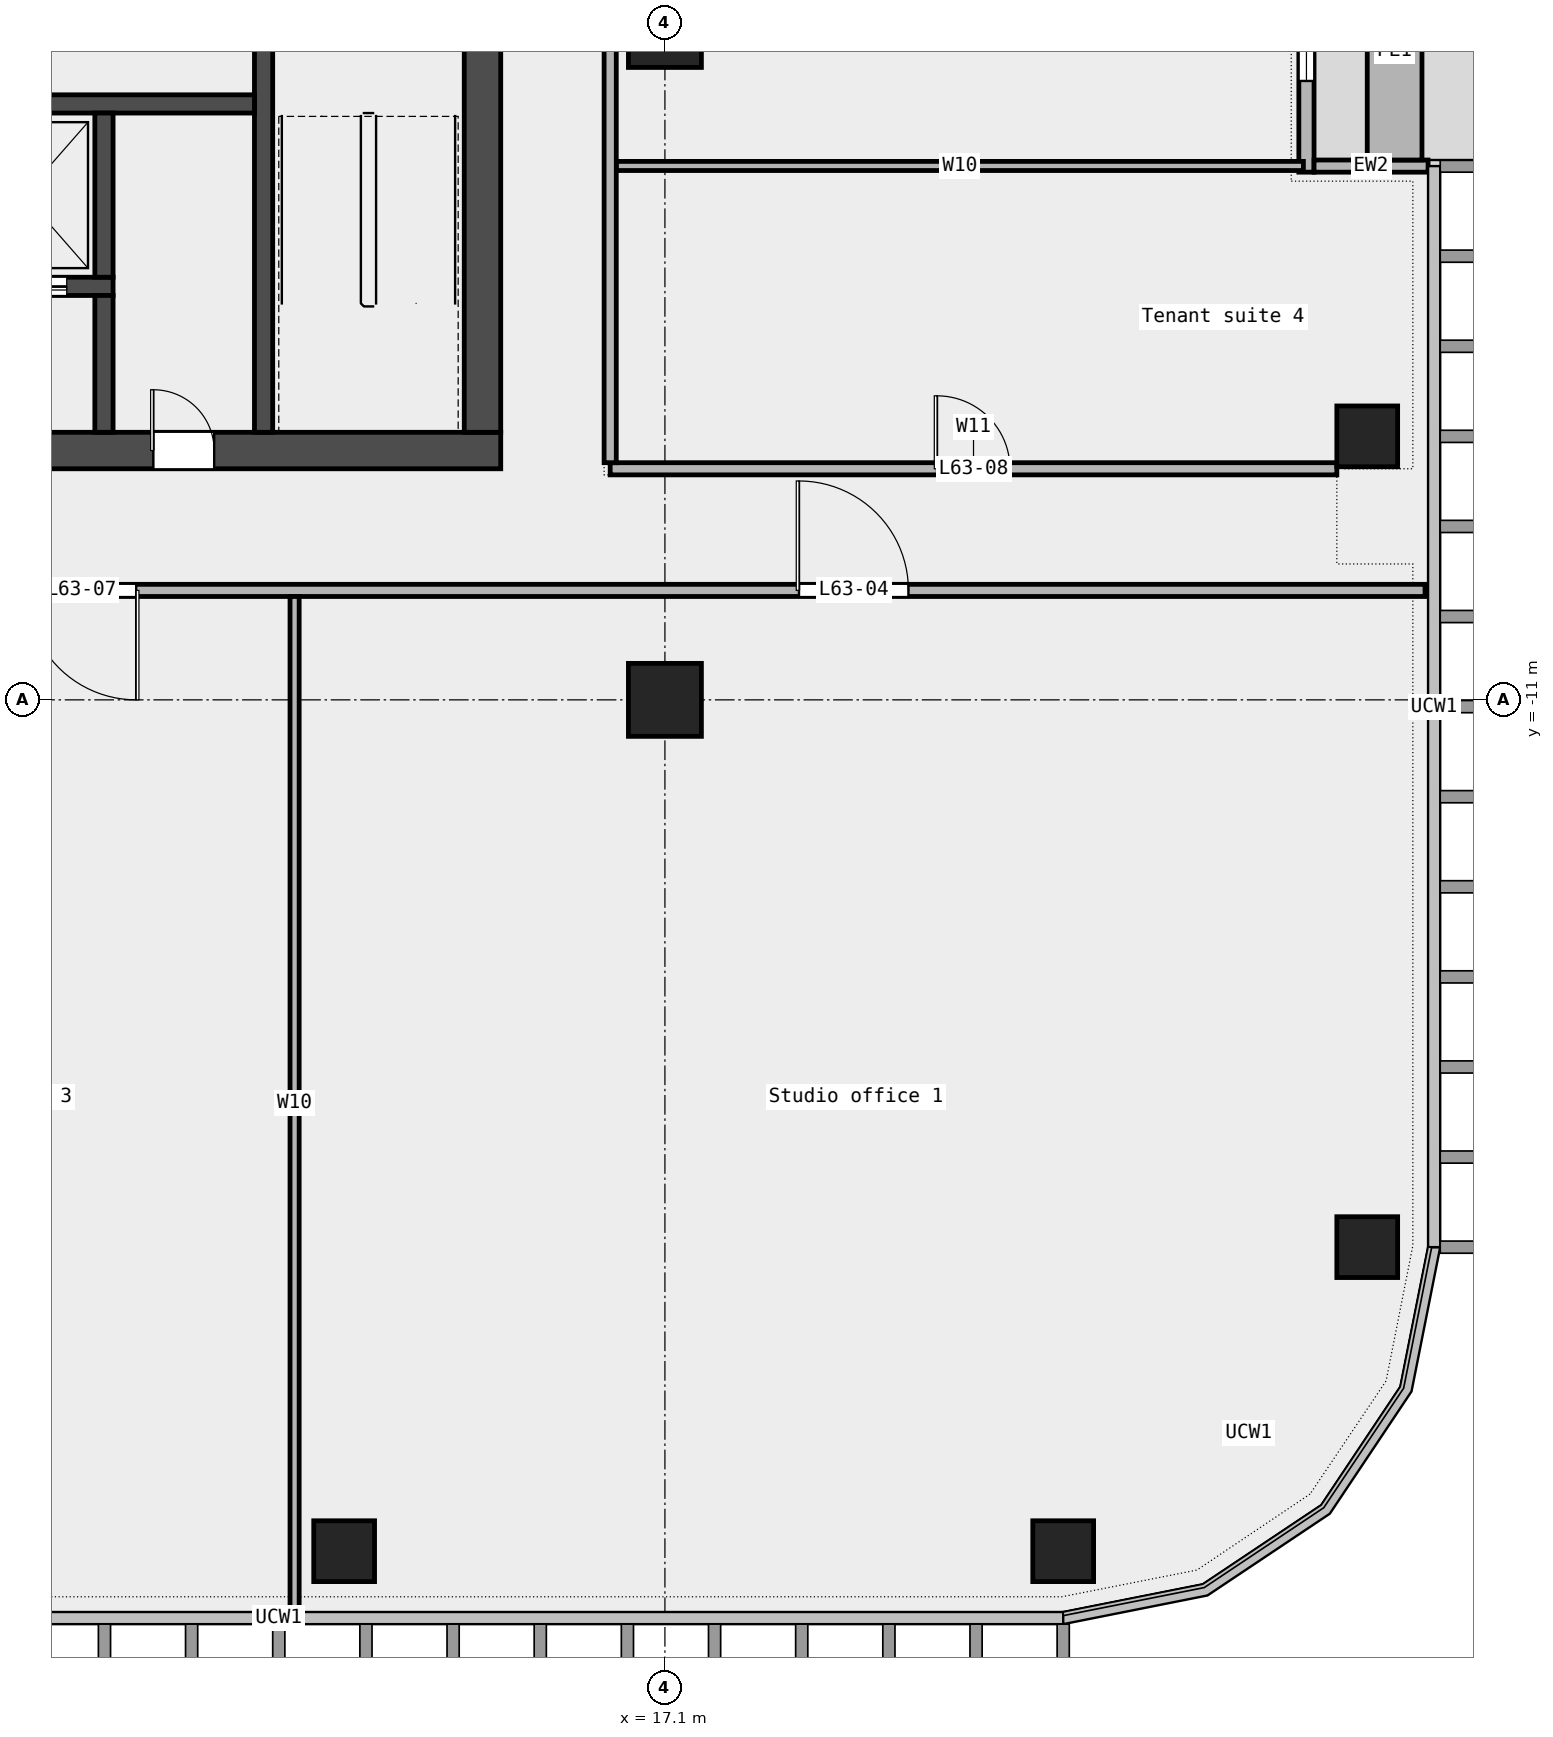
"""IFC4 building model, lengths in metres.
Left out: names, types, materials, properties, quantities, classifications, styles, units other than length and angle.
Written with IfcOpenShell. Run it as: python <this file> out.ifc"""

import sys

from ifc_helpers import new_model, si_unit, direction, frame, frame_2d, origin, origin_2d, place, context, subcontext, project, spatial, rectangle, extrude, element, fill, save


model = new_model("IFC4")
c1 = context("Model", 3, precision=1e-05, world=origin(), true_north=direction((0.0, 1.0)))
c2 = subcontext(c1, "Body", "Model", "MODEL_VIEW")
j1 = project(units=[si_unit("LENGTHUNIT", "METRE"), si_unit("PLANEANGLEUNIT", "RADIAN")], contexts=[c1])
p1 = place(None, origin())
s1 = spatial("IfcSite", under=j1, at=p1, CompositionType="ELEMENT")
p2 = place(p1, origin())
s2 = spatial("IfcBuilding", under=s1, at=p2, CompositionType="ELEMENT")
p3 = place(p2, frame((0.0, 0.0, 291.4)))
s3 = spatial("IfcBuildingStorey", under=s2, at=p3, CompositionType="ELEMENT", Elevation=291.4)
for number, where, z_axis, x_axis in (
    (1, (11.825, -25.0, 0.0), (0.0, 0.0, 1.0), (1.0, 0.0, 0.0)),
    (2, (23.65, -25.0, 0.0), (0.0, 0.0, 1.0), (1.0, 0.0, 0.0)),
    (3, (28.65, -20.0, 0.0), (0.0, 0.0, 1.0), (1.0, 0.0, 0.0)),
    (4, (28.65, -6.667, 0.0), (0.0, 0.0, 1.0), (1.0, 0.0, 0.0)),
):
    element("IfcColumn", number, at=place(p3, frame(where, z_axis=z_axis, x_axis=x_axis)), inside=s3, PredefinedType="COLUMN", context=c2, shape_type="SweptSolid", body=[
        extrude(rectangle(XDim=1.0, YDim=1.0, at=origin_2d()), origin(), (0.0, 0.0, 1.0), 3.6),
    ])
for number, where, z_axis, x_axis in (
    (5, (17.1, -11.0, 0.0), (0.0, 0.0, 1.0), (1.0, 0.0, 0.0)),
    (6, (17.1, 0.0, 0.0), (0.0, 0.0, 1.0), (1.0, 0.0, 0.0)),
):
    element("IfcColumn", number, at=place(p3, frame(where, z_axis=z_axis, x_axis=x_axis)), inside=s3, PredefinedType="COLUMN", context=c2, shape_type="SweptSolid", body=[
        extrude(rectangle(XDim=1.2, YDim=1.2, at=origin_2d()), origin(), (0.0, 0.0, 1.0), 3.6),
    ])
p4 = place(p3, frame((27.65, -2.322, 0.0), z_axis=(0.0, 0.0, 1.0), x_axis=(0.0, 1.0, 0.0)))
e7 = element("IfcWall", 7, at=p4, inside=s3, PredefinedType="STANDARD", context=c2, shape_type="SweptSolid", body=[
    extrude(rectangle(XDim=13.533, YDim=0.25, at=frame_2d((6.767, 0.0))), origin(), (0.0, 0.0, 1.0), 3.6),
])
p5 = place(p4, frame((1.5, 0.0, 0.45)))
e8 = element("IfcOpeningElement", 8, at=p5, cuts=e7, PredefinedType="OPENING", context=c2, shape_type="SweptSolid", body=[
    extrude(rectangle(XDim=1.5, YDim=2.4, at=frame_2d((0.75, 1.2))), frame((0.0, 0.137, 0.0), z_axis=(0.0, -1.0, 0.0), x_axis=(1.0, 0.0, 0.0)), (0.0, 0.0, 1.0), 0.274),
])
p6 = place(p4, frame((5.75, 0.0, 0.0)))
e9 = element("IfcOpeningElement", 9, at=p6, cuts=e7, PredefinedType="OPENING", context=c2, shape_type="SweptSolid", body=[
    extrude(rectangle(XDim=1.8, YDim=2.4, at=frame_2d((0.9, 1.2))), frame((0.0, 0.137, 0.0), z_axis=(0.0, -1.0, 0.0), x_axis=(1.0, 0.0, 0.0)), (0.0, 0.0, 1.0), 0.274),
])
p7 = place(p4, frame((10.5, 0.0, 0.45)))
e10 = element("IfcOpeningElement", 10, at=p7, cuts=e7, PredefinedType="OPENING", context=c2, shape_type="SweptSolid", body=[
    extrude(rectangle(XDim=1.5, YDim=2.4, at=frame_2d((0.75, 1.2))), frame((0.0, 0.137, 0.0), z_axis=(0.0, -1.0, 0.0), x_axis=(1.0, 0.0, 0.0)), (0.0, 0.0, 1.0), 0.274),
])
p8 = place(p3, frame((29.65, -2.222, 0.0), z_axis=(0.0, 0.0, 1.0), x_axis=(-1.0, 0.0, 0.0)))
e11 = element("IfcWall", 11, at=p8, inside=s3, PredefinedType="STANDARD", context=c2, shape_type="SweptSolid", body=[
    extrude(rectangle(XDim=1.875, YDim=0.2, at=frame_2d((0.938, 0.0))), origin(), (0.0, 0.0, 1.0), 3.6),
])
p9 = place(p3, frame((29.1, -2.122, 0.0), z_axis=(0.0, 0.0, 1.0), x_axis=(0.0, 1.0, 0.0)))
e12 = element("IfcWall", 12, at=p9, inside=s3, PredefinedType="STANDARD", context=c2, shape_type="SweptSolid", body=[
    extrude(rectangle(XDim=3.6, YDim=0.9, at=frame_2d((1.8, 0.0))), origin(), (0.0, 0.0, 1.0), 0.7),
])
p10 = place(p3, frame((-29.6, -9.2, 0.0), z_axis=(0.0, 0.0, 1.0), x_axis=(1.0, 0.0, 0.0)))
e13 = element("IfcWall", 13, at=p10, inside=s3, PredefinedType="PARTITIONING", context=c2, shape_type="SweptSolid", body=[
    extrude(rectangle(XDim=59.2, YDim=0.2, at=frame_2d((29.6, 0.0))), origin(), (0.0, 0.0, 1.0), 3.6),
])
p11 = place(p10, frame((48.905, 0.0, 0.0)))
e14 = element("IfcOpeningElement", 14, at=p11, cuts=e13, PredefinedType="OPENING", context=c2, shape_type="SweptSolid", body=[
    extrude(rectangle(XDim=1.8, YDim=2.1, at=frame_2d((0.9, 1.05))), frame((0.0, 0.112, 0.0), z_axis=(0.0, -1.0, 0.0), x_axis=(1.0, 0.0, 0.0)), (0.0, 0.0, 1.0), 0.224),
])
p12 = place(p10, frame((36.205, 0.0, 0.0)))
e15 = element("IfcOpeningElement", 15, at=p12, cuts=e13, PredefinedType="OPENING", context=c2, shape_type="SweptSolid", body=[
    extrude(rectangle(XDim=1.8, YDim=2.1, at=frame_2d((0.9, 1.05))), frame((0.0, 0.112, 0.0), z_axis=(0.0, -1.0, 0.0), x_axis=(1.0, 0.0, 0.0)), (0.0, 0.0, 1.0), 0.224),
])
p13 = place(p10, frame((20.1, 0.0, 0.0)))
e16 = element("IfcOpeningElement", 16, at=p13, cuts=e13, PredefinedType="OPENING", context=c2, shape_type="SweptSolid", body=[
    extrude(rectangle(XDim=1.8, YDim=2.1, at=frame_2d((0.9, 1.05))), frame((0.0, 0.112, 0.0), z_axis=(0.0, -1.0, 0.0), x_axis=(1.0, 0.0, 0.0)), (0.0, 0.0, 1.0), 0.224),
])
p14 = place(p10, frame((6.475, 0.0, 0.0)))
e17 = element("IfcOpeningElement", 17, at=p14, cuts=e13, PredefinedType="OPENING", context=c2, shape_type="SweptSolid", body=[
    extrude(rectangle(XDim=1.8, YDim=2.1, at=frame_2d((0.9, 1.05))), frame((0.0, 0.112, 0.0), z_axis=(0.0, -1.0, 0.0), x_axis=(1.0, 0.0, 0.0)), (0.0, 0.0, 1.0), 0.224),
])
p15 = place(p10, frame((28.425, 0.0, 0.0)))
e18 = element("IfcOpeningElement", 18, at=p15, cuts=e13, PredefinedType="OPENING", context=c2, shape_type="SweptSolid", body=[
    extrude(rectangle(XDim=1.2, YDim=2.1, at=frame_2d((0.6, 1.05))), frame((0.0, 0.112, 0.0), z_axis=(0.0, -1.0, 0.0), x_axis=(1.0, 0.0, 0.0)), (0.0, 0.0, 1.0), 0.224),
])
p16 = place(p3, frame((16.2, -7.2, 0.0), z_axis=(0.0, 0.0, 1.0), x_axis=(1.0, 0.0, 0.0)))
e19 = element("IfcWall", 19, at=p16, inside=s3, PredefinedType="PARTITIONING", context=c2, shape_type="SweptSolid", body=[
    extrude(rectangle(XDim=11.95, YDim=0.2, at=frame_2d((5.975, 0.0))), origin(), (0.0, 0.0, 1.0), 3.6),
])
p17 = place(p16, frame((5.375, 0.0, 0.0)))
e20 = element("IfcOpeningElement", 20, at=p17, cuts=e19, PredefinedType="OPENING", context=c2, shape_type="SweptSolid", body=[
    extrude(rectangle(XDim=1.2, YDim=2.1, at=frame_2d((0.6, 1.05))), frame((0.0, 0.112, 0.0), z_axis=(0.0, -1.0, 0.0), x_axis=(1.0, 0.0, 0.0)), (0.0, 0.0, 1.0), 0.224),
])
p18 = place(p3, frame((16.3, -2.22, 0.0), z_axis=(0.0, 0.0, 1.0), x_axis=(1.0, 0.0, 0.0)))
e21 = element("IfcWall", 21, at=p18, inside=s3, PredefinedType="PARTITIONING", context=c2, shape_type="SweptSolid", body=[
    extrude(rectangle(XDim=11.3, YDim=0.15, at=frame_2d((5.65, 0.0))), origin(), (0.0, 0.0, 1.0), 3.6),
])
p19 = place(p3, frame((11.01, -25.95, 0.0), z_axis=(0.0, 0.0, 1.0), x_axis=(0.0, 1.0, 0.0)))
e22 = element("IfcWall", 22, at=p19, inside=s3, PredefinedType="PARTITIONING", context=c2, shape_type="SweptSolid", body=[
    extrude(rectangle(XDim=16.65, YDim=0.15, at=frame_2d((8.325, 0.0))), origin(), (0.0, 0.0, 1.0), 3.6),
])
p20 = place(p3, frame((16.2, -7.1, 0.0), z_axis=(0.0, 0.0, 1.0), x_axis=(0.0, 1.0, 0.0)))
e23 = element("IfcWall", 23, at=p20, inside=s3, PredefinedType="PARTITIONING", context=c2, shape_type="SweptSolid", body=[
    extrude(rectangle(XDim=20.5, YDim=0.2, at=frame_2d((10.25, 0.0))), origin(), (0.0, 0.0, 1.0), 3.6),
])
p21 = place(p20, frame((10.795, 0.0, 0.0)))
e24 = element("IfcOpeningElement", 24, at=p21, cuts=e23, PredefinedType="OPENING", context=c2, shape_type="SweptSolid", body=[
    extrude(rectangle(XDim=1.5, YDim=2.1, at=frame_2d((0.75, 1.05))), frame((0.0, 0.112, 0.0), z_axis=(0.0, -1.0, 0.0), x_axis=(1.0, 0.0, 0.0)), (0.0, 0.0, 1.0), 0.224),
])
p22 = place(p3, frame((-14.4, -6.9, 0.0), z_axis=(0.0, 0.0, 1.0), x_axis=(1.0, 0.0, 0.0)))
e25 = element("IfcWall", 25, at=p22, inside=s3, PredefinedType="SHEAR", context=c2, shape_type="SweptSolid", body=[
    extrude(rectangle(XDim=28.8, YDim=0.6, at=frame_2d((14.4, 0.0))), origin(), (0.0, 0.0, 1.0), 3.7),
])
p23 = place(p22, frame((4.712, 0.0, 0.0)))
e26 = element("IfcOpeningElement", 26, at=p23, cuts=e25, PredefinedType="OPENING", context=c2, shape_type="SweptSolid", body=[
    extrude(rectangle(XDim=1.0, YDim=2.1, at=frame_2d((0.5, 1.05))), frame((0.0, 0.312, 0.0), z_axis=(0.0, -1.0, 0.0), x_axis=(1.0, 0.0, 0.0)), (0.0, 0.0, 1.0), 0.624),
])
p24 = place(p22, frame((9.675, 0.0, 0.0)))
e27 = element("IfcOpeningElement", 27, at=p24, cuts=e25, PredefinedType="OPENING", context=c2, shape_type="SweptSolid", body=[
    extrude(rectangle(XDim=1.2, YDim=2.1, at=frame_2d((0.6, 1.05))), frame((0.0, 0.312, 0.0), z_axis=(0.0, -1.0, 0.0), x_axis=(1.0, 0.0, 0.0)), (0.0, 0.0, 1.0), 0.624),
])
p25 = place(p22, frame((15.025, 0.0, 0.0)))
e28 = element("IfcOpeningElement", 28, at=p25, cuts=e25, PredefinedType="OPENING", context=c2, shape_type="SweptSolid", body=[
    extrude(rectangle(XDim=1.0, YDim=2.1, at=frame_2d((0.5, 1.05))), frame((0.0, 0.312, 0.0), z_axis=(0.0, -1.0, 0.0), x_axis=(1.0, 0.0, 0.0)), (0.0, 0.0, 1.0), 0.624),
])
p26 = place(p22, frame((18.75, 0.0, 0.0)))
e29 = element("IfcOpeningElement", 29, at=p26, cuts=e25, PredefinedType="OPENING", context=c2, shape_type="SweptSolid", body=[
    extrude(rectangle(XDim=1.8, YDim=2.1, at=frame_2d((0.9, 1.05))), frame((0.0, 0.312, 0.0), z_axis=(0.0, -1.0, 0.0), x_axis=(1.0, 0.0, 0.0)), (0.0, 0.0, 1.0), 0.624),
])
p27 = place(p22, frame((23.087, 0.0, 0.0)))
e30 = element("IfcOpeningElement", 30, at=p27, cuts=e25, PredefinedType="OPENING", context=c2, shape_type="SweptSolid", body=[
    extrude(rectangle(XDim=1.0, YDim=2.1, at=frame_2d((0.5, 1.05))), frame((0.0, 0.312, 0.0), z_axis=(0.0, -1.0, 0.0), x_axis=(1.0, 0.0, 0.0)), (0.0, 0.0, 1.0), 0.624),
])
p28 = place(p3, frame((14.1, -6.6, 0.0), z_axis=(0.0, 0.0, 1.0), x_axis=(0.0, 1.0, 0.0)))
e31 = element("IfcWall", 31, at=p28, inside=s3, PredefinedType="SHEAR", context=c2, shape_type="SweptSolid", body=[
    extrude(rectangle(XDim=19.5, YDim=0.6, at=frame_2d((9.75, 0.0))), origin(), (0.0, 0.0, 1.0), 3.7),
])
p29 = place(p28, frame((9.3, 0.0, 0.0)))
e32 = element("IfcOpeningElement", 32, at=p29, cuts=e31, PredefinedType="OPENING", context=c2, shape_type="SweptSolid", body=[
    extrude(rectangle(XDim=1.8, YDim=2.1, at=frame_2d((0.9, 1.05))), frame((0.0, 0.312, 0.0), z_axis=(0.0, -1.0, 0.0), x_axis=(1.0, 0.0, 0.0)), (0.0, 0.0, 1.0), 0.624),
])
p30 = place(p3, frame((10.5, -6.6, 0.0), z_axis=(0.0, 0.0, 1.0), x_axis=(0.0, 1.0, 0.0)))
e33 = element("IfcWall", 33, at=p30, inside=s3, PredefinedType="SHEAR", context=c2, shape_type="SweptSolid", body=[
    extrude(rectangle(XDim=8.55, YDim=0.3, at=frame_2d((4.275, 0.0))), origin(), (0.0, 0.0, 1.0), 3.7),
])
p31 = place(p3, frame((-10.35, -1.2, 0.0), z_axis=(0.0, 0.0, 1.0), x_axis=(1.0, 0.0, 0.0)))
e34 = element("IfcWall", 34, at=p31, inside=s3, PredefinedType="SOLIDWALL", context=c2, shape_type="SweptSolid", body=[
    extrude(rectangle(XDim=20.7, YDim=0.3, at=frame_2d((10.35, 0.0))), origin(), (0.0, 0.0, 1.0), 3.7),
])
p32 = place(p3, frame((2.475, -4.2, 0.0), z_axis=(0.0, 0.0, 1.0), x_axis=(1.0, 0.0, 0.0)))
e35 = element("IfcWall", 35, at=p32, inside=s3, PredefinedType="SOLIDWALL", context=c2, shape_type="SweptSolid", body=[
    extrude(rectangle(XDim=5.55, YDim=0.3, at=frame_2d((2.775, 0.0))), origin(), (0.0, 0.0, 1.0), 3.7),
])
p33 = place(p32, frame((0.762, 0.0, 0.0)))
e36 = element("IfcOpeningElement", 36, at=p33, cuts=e35, PredefinedType="OPENING", context=c2, shape_type="SweptSolid", body=[
    extrude(rectangle(XDim=1.4, YDim=2.1, at=frame_2d((0.7, 1.05))), frame((0.0, 0.162, 0.0), z_axis=(0.0, -1.0, 0.0), x_axis=(1.0, 0.0, 0.0)), (0.0, 0.0, 1.0), 0.324),
])
p34 = place(p32, frame((3.387, 0.0, 0.0)))
e37 = element("IfcOpeningElement", 37, at=p34, cuts=e35, PredefinedType="OPENING", context=c2, shape_type="SweptSolid", body=[
    extrude(rectangle(XDim=1.4, YDim=2.1, at=frame_2d((0.7, 1.05))), frame((0.0, 0.162, 0.0), z_axis=(0.0, -1.0, 0.0), x_axis=(1.0, 0.0, 0.0)), (0.0, 0.0, 1.0), 0.324),
])
p35 = place(p3, frame((7.875, -4.05, 0.0), z_axis=(0.0, 0.0, 1.0), x_axis=(0.0, 1.0, 0.0)))
e38 = element("IfcWall", 38, at=p35, inside=s3, PredefinedType="SOLIDWALL", context=c2, shape_type="SweptSolid", body=[
    extrude(rectangle(XDim=2.7, YDim=0.3, at=frame_2d((1.35, 0.0))), origin(), (0.0, 0.0, 1.0), 3.7),
])
p36 = place(p3, frame((7.875, -6.6, 0.0), z_axis=(0.0, 0.0, 1.0), x_axis=(0.0, 1.0, 0.0)))
e39 = element("IfcWall", 39, at=p36, inside=s3, PredefinedType="SOLIDWALL", context=c2, shape_type="SweptSolid", body=[
    extrude(rectangle(XDim=2.25, YDim=0.3, at=frame_2d((1.125, 0.0))), origin(), (0.0, 0.0, 1.0), 3.7),
])
p37 = place(p5, origin())
e40 = element("IfcWindow", 40, at=p37, inside=s3, PartitioningType="SINGLE_PANEL", PredefinedType="WINDOW", context=c2, shape_type="SweptSolid", body=[
    extrude(rectangle(XDim=1.5, YDim=2.4, at=frame_2d((0.75, 1.2))), frame((0.0, 0.03, 0.0), z_axis=(0.0, -1.0, 0.0), x_axis=(1.0, 0.0, 0.0)), (0.0, 0.0, 1.0), 0.06),
])
fill(e8, e40)
p38 = place(p11, origin())
e41 = element("IfcDoor", 41, at=p38, inside=s3, OperationType="DOUBLE_DOOR_SINGLE_SWING", PredefinedType="DOOR", context=c2, shape_type="SweptSolid", body=[
    extrude(rectangle(XDim=1.8, YDim=2.1, at=frame_2d((0.9, 1.05))), frame((0.0, 0.025, 0.0), z_axis=(0.0, -1.0, 0.0), x_axis=(1.0, 0.0, 0.0)), (0.0, 0.0, 1.0), 0.05),
])
fill(e14, e41)
p39 = place(p12, origin())
e42 = element("IfcDoor", 42, at=p39, inside=s3, OperationType="DOUBLE_DOOR_SINGLE_SWING", PredefinedType="DOOR", context=c2, shape_type="SweptSolid", body=[
    extrude(rectangle(XDim=1.8, YDim=2.1, at=frame_2d((0.9, 1.05))), frame((0.0, 0.025, 0.0), z_axis=(0.0, -1.0, 0.0), x_axis=(1.0, 0.0, 0.0)), (0.0, 0.0, 1.0), 0.05),
])
fill(e15, e42)
p40 = place(p17, origin())
e43 = element("IfcDoor", 43, at=p40, inside=s3, OperationType="SINGLE_SWING_LEFT", PredefinedType="DOOR", context=c2, shape_type="SweptSolid", body=[
    extrude(rectangle(XDim=1.2, YDim=2.1, at=frame_2d((0.6, 1.05))), frame((0.0, 0.025, 0.0), z_axis=(0.0, -1.0, 0.0), x_axis=(1.0, 0.0, 0.0)), (0.0, 0.0, 1.0), 0.05),
])
fill(e20, e43)
p41 = place(p34, origin())
e44 = element("IfcDoor", 44, at=p41, inside=s3, OperationType="DOUBLE_DOOR_SLIDING", PredefinedType="DOOR", context=c2, shape_type="SweptSolid", body=[
    extrude(rectangle(XDim=1.4, YDim=2.1, at=frame_2d((0.7, 1.05))), frame((0.0, 0.025, 0.0), z_axis=(0.0, -1.0, 0.0), x_axis=(1.0, 0.0, 0.0)), (0.0, 0.0, 1.0), 0.05),
])
fill(e37, e44)
p42 = place(p27, origin())
e45 = element("IfcDoor", 45, at=p42, inside=s3, OperationType="SINGLE_SWING_LEFT", PredefinedType="DOOR", context=c2, shape_type="SweptSolid", body=[
    extrude(rectangle(XDim=1.0, YDim=2.1, at=frame_2d((0.5, 1.05))), frame((0.0, 0.025, 0.0), z_axis=(0.0, -1.0, 0.0), x_axis=(1.0, 0.0, 0.0)), (0.0, 0.0, 1.0), 0.05),
])
fill(e30, e45)
save(model, sys.argv[1])
